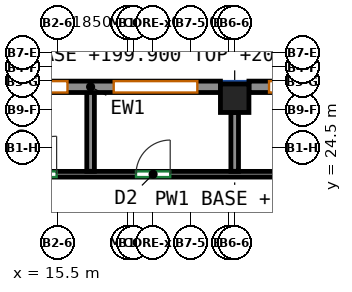
"""IFC4 building model, lengths in metres.
Left out: names, types, materials, properties, quantities, classifications, styles, units other than length and angle.
Written with IfcOpenShell. Run it as: python <this file> out.ifc"""

import sys

from ifc_helpers import new_model, si_unit, direction, frame, frame_2d, origin, origin_2d, place, context, subcontext, project, spatial, rectangle, extrude, source, transform, mapped, element, fill, save


model = new_model("IFC4")
c1 = context("Model", 3, precision=1e-05, world=origin(), true_north=direction((0.0, 1.0)))
c2 = subcontext(c1, "Body", "Model", "MODEL_VIEW")
j1 = project(units=[si_unit("LENGTHUNIT", "METRE"), si_unit("PLANEANGLEUNIT", "RADIAN")], contexts=[c1])
p1 = place(None, origin())
s1 = spatial("IfcSite", under=j1, at=p1, CompositionType="ELEMENT")
p2 = place(p1, origin())
s2 = spatial("IfcBuilding", under=s1, at=p2, CompositionType="ELEMENT")
p3 = place(p2, frame((0.0, 0.0, 199.9)))
s3 = spatial("IfcBuildingStorey", under=s2, at=p3, CompositionType="ELEMENT", Elevation=199.9)
m1 = source(origin(), c2, "Body", "SweptSolid", [
    extrude(rectangle(XDim=0.75, YDim=0.75, at=origin_2d()), origin(), (0.0, 0.0, 1.0), 3.12),
])
p4 = place(p3, frame((20.167, 25.8, 0.0), z_axis=(0.0, 0.0, 1.0), x_axis=(1.0, 0.0, 0.0)))
e1 = element("IfcColumn", 1, at=p4, inside=s3, PredefinedType="COLUMN", context=c2, shape_type="MappedRepresentation", body=[
    mapped(m1, transform((0.0, 0.0, 0.0))),
])
m2 = source(origin(), c2, "Body", "SweptSolid", [
    extrude(rectangle(XDim=6.515, YDim=0.3, at=frame_2d((3.258, 0.0))), origin(), (0.0, 0.0, 1.0), 3.12),
])
p5 = place(p3, frame((27.057, 26.1, 0.0), z_axis=(0.0, 0.0, 1.0), x_axis=(-1.0, 0.0, 0.0)))
e2 = element("IfcWall", 2, at=p5, inside=s3, PredefinedType="SOLIDWALL", context=c2, shape_type="MappedRepresentation", body=[
    mapped(m2, transform((0.0, 0.0, 0.0))),
])
p6 = place(p5, frame((0.529, 0.0, 0.85)))
e3 = element("IfcOpeningElement", 3, at=p6, cuts=e2, PredefinedType="OPENING", context=c2, shape_type="SweptSolid", body=[
    extrude(rectangle(XDim=2.2, YDim=1.95, at=frame_2d((1.1, 0.975))), frame((0.0, 0.16, 0.0), z_axis=(0.0, -1.0, 0.0), x_axis=(1.0, 0.0, 0.0)), (0.0, 0.0, 1.0), 0.32),
])
p7 = place(p5, frame((3.786, 0.0, 0.85)))
e4 = element("IfcOpeningElement", 4, at=p7, cuts=e2, PredefinedType="OPENING", context=c2, shape_type="SweptSolid", body=[
    extrude(rectangle(XDim=2.2, YDim=1.95, at=frame_2d((1.1, 0.975))), frame((0.0, 0.16, 0.0), z_axis=(0.0, -1.0, 0.0), x_axis=(1.0, 0.0, 0.0)), (0.0, 0.0, 1.0), 0.32),
])
m3 = source(origin(), c2, "Body", "SweptSolid", [
    extrude(rectangle(XDim=6.833, YDim=0.3, at=frame_2d((3.417, 0.0))), origin(), (0.0, 0.0, 1.0), 3.12),
])
p8 = place(p3, frame((19.792, 26.1, 0.0), z_axis=(0.0, 0.0, 1.0), x_axis=(-1.0, 0.0, 0.0)))
e5 = element("IfcWall", 5, at=p8, inside=s3, PredefinedType="SOLIDWALL", context=c2, shape_type="MappedRepresentation", body=[
    mapped(m3, transform((0.0, 0.0, 0.0))),
])
p9 = place(p8, frame((0.608, 0.0, 0.85)))
e6 = element("IfcOpeningElement", 6, at=p9, cuts=e5, PredefinedType="OPENING", context=c2, shape_type="SweptSolid", body=[
    extrude(rectangle(XDim=2.2, YDim=1.95, at=frame_2d((1.1, 0.975))), frame((0.0, 0.16, 0.0), z_axis=(0.0, -1.0, 0.0), x_axis=(1.0, 0.0, 0.0)), (0.0, 0.0, 1.0), 0.32),
])
p10 = place(p8, frame((4.025, 0.0, 0.85)))
e7 = element("IfcOpeningElement", 7, at=p10, cuts=e5, PredefinedType="OPENING", context=c2, shape_type="SweptSolid", body=[
    extrude(rectangle(XDim=2.2, YDim=1.95, at=frame_2d((1.1, 0.975))), frame((0.0, 0.16, 0.0), z_axis=(0.0, -1.0, 0.0), x_axis=(1.0, 0.0, 0.0)), (0.0, 0.0, 1.0), 0.32),
])
p11 = place(p3, frame((-17.85, 23.8, 0.0), z_axis=(0.0, 0.0, 1.0), x_axis=(1.0, 0.0, 0.0)))
e8 = element("IfcWall", 8, at=p11, inside=s3, PredefinedType="PARTITIONING", context=c2, shape_type="SweptSolid", body=[
    extrude(rectangle(XDim=45.7, YDim=0.15, at=frame_2d((22.85, 0.0))), origin(), (0.0, 0.0, 1.0), 3.12),
])
p12 = place(p11, frame((0.6, 0.0, 0.0)))
e9 = element("IfcOpeningElement", 9, at=p12, cuts=e8, PredefinedType="OPENING", context=c2, shape_type="SweptSolid", body=[
    extrude(rectangle(XDim=0.9, YDim=2.1, at=frame_2d((0.45, 1.05))), frame((0.0, 0.085, 0.0), z_axis=(0.0, -1.0, 0.0), x_axis=(1.0, 0.0, 0.0)), (0.0, 0.0, 1.0), 0.17),
])
p13 = place(p11, frame((4.081, 0.0, 0.0)))
e10 = element("IfcOpeningElement", 10, at=p13, cuts=e8, PredefinedType="OPENING", context=c2, shape_type="SweptSolid", body=[
    extrude(rectangle(XDim=1.0, YDim=2.1, at=frame_2d((0.5, 1.05))), frame((0.0, 0.085, 0.0), z_axis=(0.0, -1.0, 0.0), x_axis=(1.0, 0.0, 0.0)), (0.0, 0.0, 1.0), 0.17),
])
p14 = place(p11, frame((9.481, 0.0, 0.0)))
e11 = element("IfcOpeningElement", 11, at=p14, cuts=e8, PredefinedType="OPENING", context=c2, shape_type="SweptSolid", body=[
    extrude(rectangle(XDim=0.9, YDim=2.1, at=frame_2d((0.45, 1.05))), frame((0.0, 0.085, 0.0), z_axis=(0.0, -1.0, 0.0), x_axis=(1.0, 0.0, 0.0)), (0.0, 0.0, 1.0), 0.17),
])
p15 = place(p11, frame((12.803, 0.0, 0.0)))
e12 = element("IfcOpeningElement", 12, at=p15, cuts=e8, PredefinedType="OPENING", context=c2, shape_type="SweptSolid", body=[
    extrude(rectangle(XDim=1.0, YDim=2.1, at=frame_2d((0.5, 1.05))), frame((0.0, 0.085, 0.0), z_axis=(0.0, -1.0, 0.0), x_axis=(1.0, 0.0, 0.0)), (0.0, 0.0, 1.0), 0.17),
])
p16 = place(p11, frame((15.489, 0.0, 0.0)))
e13 = element("IfcOpeningElement", 13, at=p16, cuts=e8, PredefinedType="OPENING", context=c2, shape_type="SweptSolid", body=[
    extrude(rectangle(XDim=0.9, YDim=2.1, at=frame_2d((0.45, 1.05))), frame((0.0, 0.085, 0.0), z_axis=(0.0, -1.0, 0.0), x_axis=(1.0, 0.0, 0.0)), (0.0, 0.0, 1.0), 0.17),
])
p17 = place(p11, frame((21.244, 0.0, 0.0)))
e14 = element("IfcOpeningElement", 14, at=p17, cuts=e8, PredefinedType="OPENING", context=c2, shape_type="SweptSolid", body=[
    extrude(rectangle(XDim=0.9, YDim=2.1, at=frame_2d((0.45, 1.05))), frame((0.0, 0.085, 0.0), z_axis=(0.0, -1.0, 0.0), x_axis=(1.0, 0.0, 0.0)), (0.0, 0.0, 1.0), 0.17),
])
p18 = place(p11, frame((23.542, 0.0, 0.0)))
e15 = element("IfcOpeningElement", 15, at=p18, cuts=e8, PredefinedType="OPENING", context=c2, shape_type="SweptSolid", body=[
    extrude(rectangle(XDim=1.0, YDim=2.1, at=frame_2d((0.5, 1.05))), frame((0.0, 0.085, 0.0), z_axis=(0.0, -1.0, 0.0), x_axis=(1.0, 0.0, 0.0)), (0.0, 0.0, 1.0), 0.17),
])
p19 = place(p11, frame((28.841, 0.0, 0.0)))
e16 = element("IfcOpeningElement", 16, at=p19, cuts=e8, PredefinedType="OPENING", context=c2, shape_type="SweptSolid", body=[
    extrude(rectangle(XDim=0.9, YDim=2.1, at=frame_2d((0.45, 1.05))), frame((0.0, 0.085, 0.0), z_axis=(0.0, -1.0, 0.0), x_axis=(1.0, 0.0, 0.0)), (0.0, 0.0, 1.0), 0.17),
])
p20 = place(p11, frame((32.331, 0.0, 0.0)))
e17 = element("IfcOpeningElement", 17, at=p20, cuts=e8, PredefinedType="OPENING", context=c2, shape_type="SweptSolid", body=[
    extrude(rectangle(XDim=1.0, YDim=2.1, at=frame_2d((0.5, 1.05))), frame((0.0, 0.085, 0.0), z_axis=(0.0, -1.0, 0.0), x_axis=(1.0, 0.0, 0.0)), (0.0, 0.0, 1.0), 0.17),
])
p21 = place(p11, frame((35.42, 0.0, 0.0)))
e18 = element("IfcOpeningElement", 18, at=p21, cuts=e8, PredefinedType="OPENING", context=c2, shape_type="SweptSolid", body=[
    extrude(rectangle(XDim=0.9, YDim=2.1, at=frame_2d((0.45, 1.05))), frame((0.0, 0.085, 0.0), z_axis=(0.0, -1.0, 0.0), x_axis=(1.0, 0.0, 0.0)), (0.0, 0.0, 1.0), 0.17),
])
p22 = place(p11, frame((40.317, 0.0, 0.0)))
e19 = element("IfcOpeningElement", 19, at=p22, cuts=e8, PredefinedType="OPENING", context=c2, shape_type="SweptSolid", body=[
    extrude(rectangle(XDim=0.9, YDim=2.1, at=frame_2d((0.45, 1.05))), frame((0.0, 0.085, 0.0), z_axis=(0.0, -1.0, 0.0), x_axis=(1.0, 0.0, 0.0)), (0.0, 0.0, 1.0), 0.17),
])
p23 = place(p11, frame((43.199, 0.0, 0.0)))
e20 = element("IfcOpeningElement", 20, at=p23, cuts=e8, PredefinedType="OPENING", context=c2, shape_type="SweptSolid", body=[
    extrude(rectangle(XDim=1.0, YDim=2.1, at=frame_2d((0.5, 1.05))), frame((0.0, 0.085, 0.0), z_axis=(0.0, -1.0, 0.0), x_axis=(1.0, 0.0, 0.0)), (0.0, 0.0, 1.0), 0.17),
])
p24 = place(p3, frame((16.375, 23.877, 0.0), z_axis=(0.0, 0.0, 1.0), x_axis=(0.0, 1.0, 0.0)))
e21 = element("IfcWall", 21, at=p24, inside=s3, PredefinedType="PARTITIONING", context=c2, shape_type="SweptSolid", body=[
    extrude(rectangle(XDim=2.123, YDim=0.2, at=frame_2d((1.062, 0.0))), origin(), (0.0, 0.0, 1.0), 3.12),
])
p25 = place(p3, frame((20.167, 23.877, 0.0), z_axis=(0.0, 0.0, 1.0), x_axis=(0.0, 1.0, 0.0)))
e22 = element("IfcWall", 22, at=p25, inside=s3, PredefinedType="PARTITIONING", context=c2, shape_type="SweptSolid", body=[
    extrude(rectangle(XDim=1.548, YDim=0.2, at=frame_2d((0.774, 0.0))), origin(), (0.0, 0.0, 1.0), 3.12),
])
p26 = place(p7, origin())
e23 = element("IfcWindow", 23, at=p26, inside=s3, PartitioningType="SINGLE_PANEL", PredefinedType="WINDOW", context=c2, shape_type="SweptSolid", body=[
    extrude(rectangle(XDim=2.2, YDim=1.95, at=frame_2d((1.1, 0.975))), frame((0.0, 0.03, 0.0), z_axis=(0.0, -1.0, 0.0), x_axis=(1.0, 0.0, 0.0)), (0.0, 0.0, 1.0), 0.06),
])
fill(e4, e23)
p27 = place(p9, origin())
e24 = element("IfcWindow", 24, at=p27, inside=s3, PartitioningType="SINGLE_PANEL", PredefinedType="WINDOW", context=c2, shape_type="SweptSolid", body=[
    extrude(rectangle(XDim=2.2, YDim=1.95, at=frame_2d((1.1, 0.975))), frame((0.0, 0.03, 0.0), z_axis=(0.0, -1.0, 0.0), x_axis=(1.0, 0.0, 0.0)), (0.0, 0.0, 1.0), 0.06),
])
fill(e6, e24)
p28 = place(p10, origin())
e25 = element("IfcWindow", 25, at=p28, inside=s3, PartitioningType="SINGLE_PANEL", PredefinedType="WINDOW", context=c2, shape_type="SweptSolid", body=[
    extrude(rectangle(XDim=2.2, YDim=1.95, at=frame_2d((1.1, 0.975))), frame((0.0, 0.03, 0.0), z_axis=(0.0, -1.0, 0.0), x_axis=(1.0, 0.0, 0.0)), (0.0, 0.0, 1.0), 0.06),
])
fill(e7, e25)
p29 = place(p20, origin())
e26 = element("IfcDoor", 26, at=p29, inside=s3, OperationType="SINGLE_SWING_RIGHT", PredefinedType="DOOR", context=c2, shape_type="SweptSolid", body=[
    extrude(rectangle(XDim=1.0, YDim=2.1, at=frame_2d((0.5, 1.05))), frame((0.0, 0.025, 0.0), z_axis=(0.0, -1.0, 0.0), x_axis=(1.0, 0.0, 0.0)), (0.0, 0.0, 1.0), 0.05),
])
fill(e17, e26)
p30 = place(p21, origin())
e27 = element("IfcDoor", 27, at=p30, inside=s3, OperationType="SINGLE_SWING_RIGHT", PredefinedType="DOOR", context=c2, shape_type="SweptSolid", body=[
    extrude(rectangle(XDim=0.9, YDim=2.1, at=frame_2d((0.45, 1.05))), frame((0.0, 0.025, 0.0), z_axis=(0.0, -1.0, 0.0), x_axis=(1.0, 0.0, 0.0)), (0.0, 0.0, 1.0), 0.05),
])
fill(e18, e27)
save(model, sys.argv[1])
